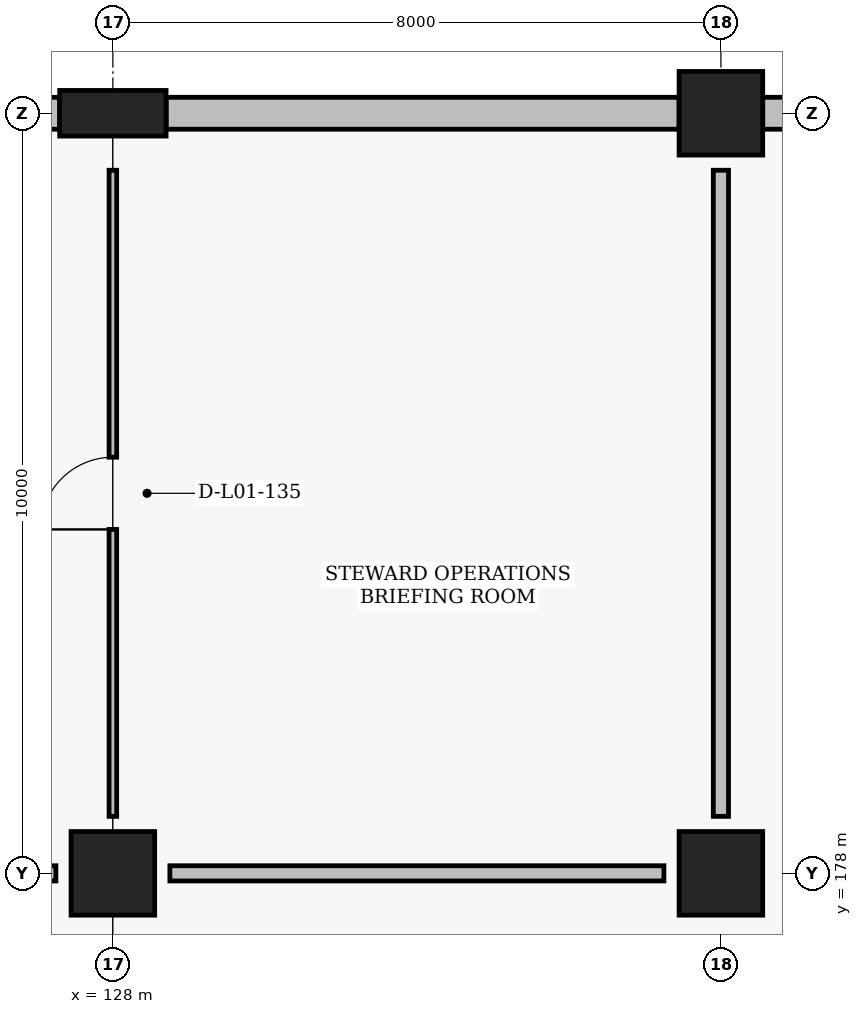
"""IFC4 building model, lengths in metres.
Left out: names, types, materials, properties, quantities, classifications, styles, units other than length and angle.
Written with IfcOpenShell. Run it as: python <this file> out.ifc"""

import sys

from ifc_helpers import new_model, si_unit, direction, frame, frame_2d, origin, origin_2d, place, context, subcontext, project, spatial, rectangle, extrude, element, fill, save


model = new_model("IFC4")
c1 = context("Model", 3, precision=1e-05, world=origin(), true_north=direction((0.0, 1.0)))
c2 = subcontext(c1, "Body", "Model", "MODEL_VIEW")
j1 = project(units=[si_unit("LENGTHUNIT", "METRE"), si_unit("PLANEANGLEUNIT", "RADIAN")], contexts=[c1])
p1 = place(None, origin())
s1 = spatial("IfcSite", under=j1, at=p1, CompositionType="ELEMENT")
p2 = place(p1, origin())
s2 = spatial("IfcBuilding", under=s1, at=p2, CompositionType="ELEMENT")
p3 = place(p2, origin())
s3 = spatial("IfcBuildingStorey", under=s2, at=p3, CompositionType="ELEMENT", Elevation=0.0)
p4 = place(p3, frame((128.0, 178.0, 0.0), z_axis=(0.0, 0.0, 1.0), x_axis=(1.0, 0.0, 0.0)))
e1 = element("IfcColumn", 1, at=p4, inside=s3, PredefinedType="COLUMN", context=c2, shape_type="SweptSolid", body=[
    extrude(rectangle(XDim=1.1, YDim=1.1, at=origin_2d()), origin(), (0.0, 0.0, 1.0), 4.8),
])
p5 = place(p3, frame((128.0, 188.0, 0.0), z_axis=(0.0, 0.0, 1.0), x_axis=(0.0, 1.0, 0.0)))
e2 = element("IfcColumn", 2, at=p5, inside=s3, PredefinedType="PILASTER", context=c2, shape_type="SweptSolid", body=[
    extrude(rectangle(XDim=0.6, YDim=1.4, at=origin_2d()), origin(), (0.0, 0.0, 1.0), 4.8),
])
for number, where, z_axis, x_axis in (
    (3, (136.0, 178.0, 0.0), (0.0, 0.0, 1.0), (1.0, 0.0, 0.0)),
    (4, (136.0, 188.0, 0.0), (0.0, 0.0, 1.0), (1.0, 0.0, 0.0)),
):
    element("IfcColumn", number, at=place(p3, frame(where, z_axis=z_axis, x_axis=x_axis)), inside=s3, PredefinedType="COLUMN", context=c2, shape_type="SweptSolid", body=[
        extrude(rectangle(XDim=1.1, YDim=1.1, at=origin_2d()), origin(), (0.0, 0.0, 1.0), 4.8),
    ])
for number, where, z_axis, x_axis in (
    (5, (120.55, 188.0, 0.0), (0.0, 0.0, 1.0), (1.0, 0.0, 0.0)),
    (6, (128.7, 188.0, 0.0), (0.0, 0.0, 1.0), (1.0, 0.0, 0.0)),
    (7, (136.55, 188.0, 0.0), (0.0, 0.0, 1.0), (1.0, 0.0, 0.0)),
):
    element("IfcWall", number, at=place(p3, frame(where, z_axis=z_axis, x_axis=x_axis)), inside=s3, PredefinedType="SOLIDWALL", context=c2, shape_type="SweptSolid", body=[
        extrude(rectangle(XDim=6.75, YDim=0.42, at=frame_2d((3.375, 0.0))), origin(), (0.0, 0.0, 1.0), 3.77),
    ])
for number, where, z_axis, x_axis in (
    (8, (120.75, 178.0, 0.0), (0.0, 0.0, 1.0), (1.0, 0.0, 0.0)),
    (9, (128.75, 178.0, 0.0), (0.0, 0.0, 1.0), (1.0, 0.0, 0.0)),
):
    element("IfcWall", number, at=place(p3, frame(where, z_axis=z_axis, x_axis=x_axis)), inside=s3, PredefinedType="PARTITIONING", context=c2, shape_type="SweptSolid", body=[
        extrude(rectangle(XDim=6.5, YDim=0.2, at=frame_2d((3.25, 0.0))), origin(), (0.0, 0.0, 1.0), 3.91),
    ])
p6 = place(p3, frame((136.0, 178.75, 0.0), z_axis=(0.0, 0.0, 1.0), x_axis=(0.0, 1.0, 0.0)))
e10 = element("IfcWall", 10, at=p6, inside=s3, PredefinedType="PARTITIONING", context=c2, shape_type="SweptSolid", body=[
    extrude(rectangle(XDim=8.5, YDim=0.2, at=frame_2d((4.25, 0.0))), origin(), (0.0, 0.0, 1.0), 3.77),
])
p7 = place(p3, frame((128.0, 178.75, 0.0), z_axis=(0.0, 0.0, 1.0), x_axis=(0.0, 1.0, 0.0)))
e11 = element("IfcWall", 11, at=p7, inside=s3, PredefinedType="PARTITIONING", context=c2, shape_type="SweptSolid", body=[
    extrude(rectangle(XDim=8.5, YDim=0.1, at=frame_2d((4.25, 0.0))), origin(), (0.0, 0.0, 1.0), 3.77),
])
p8 = place(p7, frame((3.775, 0.0, 0.0)))
e12 = element("IfcOpeningElement", 12, at=p8, cuts=e11, PredefinedType="OPENING", context=c2, shape_type="SweptSolid", body=[
    extrude(rectangle(XDim=0.95, YDim=2.1, at=frame_2d((0.475, 1.05))), frame((0.0, 0.06, 0.0), z_axis=(0.0, -1.0, 0.0), x_axis=(1.0, 0.0, 0.0)), (0.0, 0.0, 1.0), 0.12),
])
p9 = place(p8, origin())
e13 = element("IfcDoor", 13, at=p9, inside=s3, OperationType="SINGLE_SWING_LEFT", PredefinedType="DOOR", context=c2, shape_type="SweptSolid", body=[
    extrude(rectangle(XDim=0.95, YDim=2.1, at=frame_2d((0.475, 1.05))), frame((0.0, 0.025, 0.0), z_axis=(0.0, -1.0, 0.0), x_axis=(1.0, 0.0, 0.0)), (0.0, 0.0, 1.0), 0.05),
])
fill(e12, e13)
save(model, sys.argv[1])
